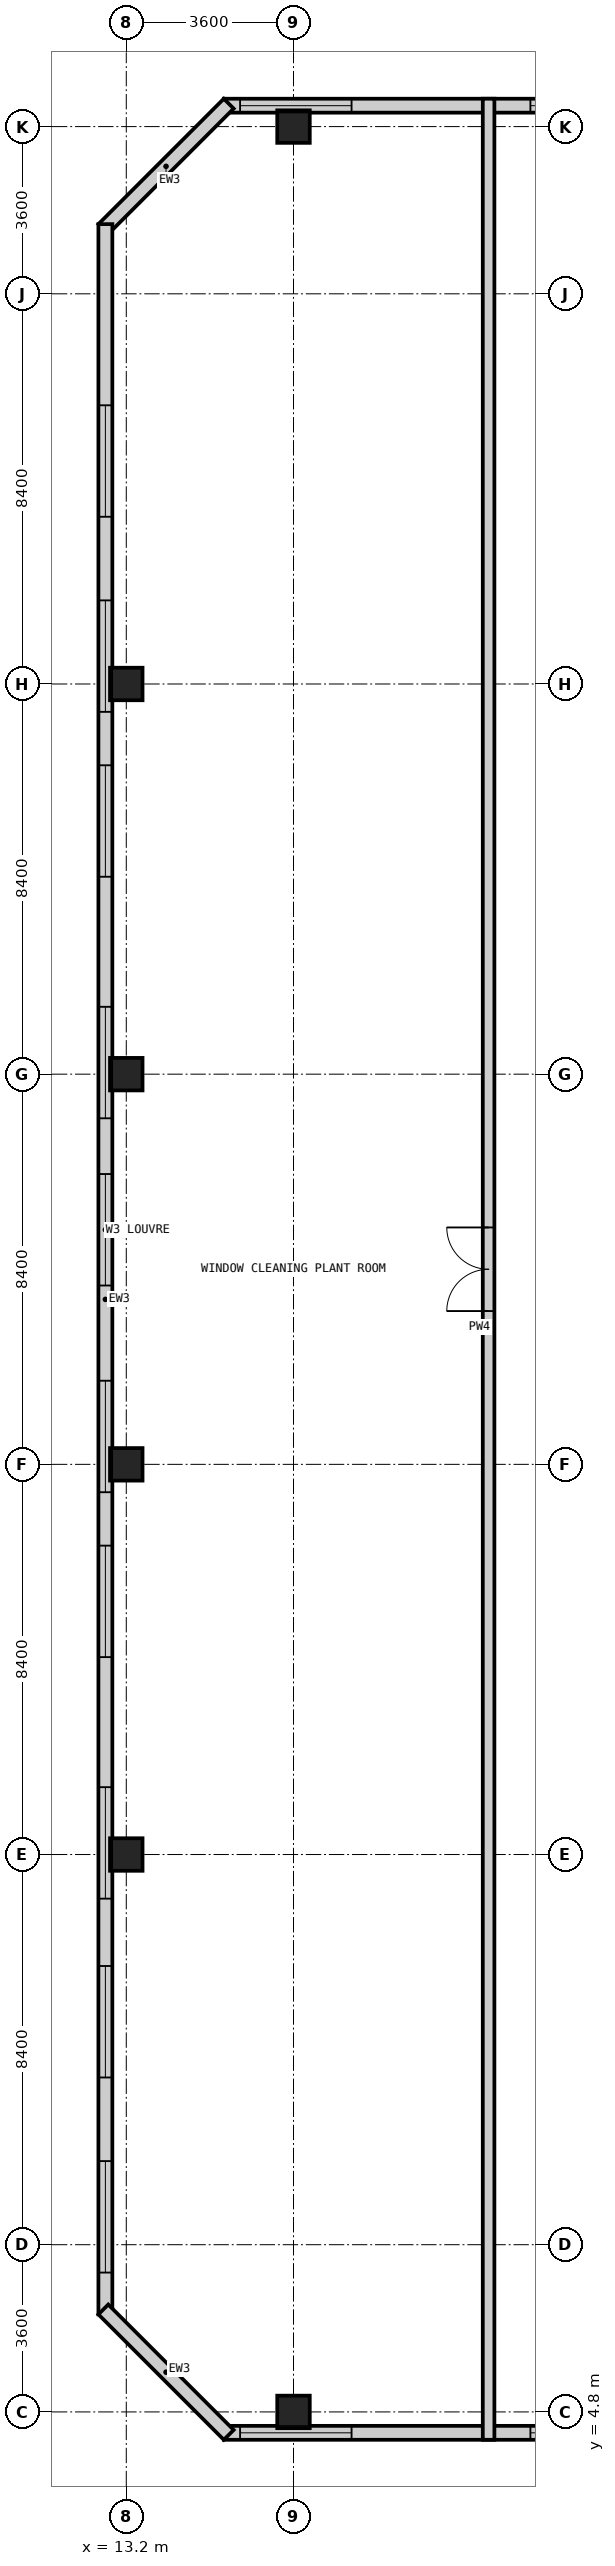
"""IFC4 building model, lengths in metres.
Left out: names, types, materials, properties, quantities, classifications, styles, units other than length and angle.
Written with IfcOpenShell. Run it as: python <this file> out.ifc"""

import sys

from ifc_helpers import new_model, si_unit, direction, frame, frame_2d, origin, origin_2d, place, context, subcontext, project, spatial, polyline, rectangle, hollow_rectangle, outline, extrude, element, fill, save


model = new_model("IFC4")
c1 = context("Model", 3, precision=1e-05, world=origin(), true_north=direction((0.0, 1.0)))
c2 = subcontext(c1, "Body", "Model", "MODEL_VIEW")
j1 = project(units=[si_unit("LENGTHUNIT", "METRE"), si_unit("PLANEANGLEUNIT", "RADIAN")], contexts=[c1])
p1 = place(None, origin())
s1 = spatial("IfcSite", under=j1, at=p1, CompositionType="ELEMENT")
p2 = place(p1, origin())
s2 = spatial("IfcBuilding", under=s1, at=p2, CompositionType="ELEMENT")
p3 = place(p2, frame((0.0, 0.0, 293.6)))
s3 = spatial("IfcBuildingStorey", under=s2, at=p3, CompositionType="ELEMENT", Elevation=293.6)
p4 = place(p3, frame((16.8, 4.8, -0.35), z_axis=(0.0, 0.0, 1.0), x_axis=(1.0, 0.0, 0.0)))
e1 = element("IfcColumn", 1, at=p4, inside=s3, PredefinedType="COLUMN", context=c2, shape_type="SweptSolid", body=[
    extrude(hollow_rectangle(XDim=0.7, YDim=0.7, WallThickness=0.06, at=origin_2d()), origin(), (0.0, 0.0, 1.0), 5.106),
])
for number, where, z_axis, x_axis in (
    (2, (13.2, 16.8, -0.35), (0.0, 0.0, 1.0), (1.0, 0.0, 0.0)),
    (3, (13.2, 25.2, -0.35), (0.0, 0.0, 1.0), (1.0, 0.0, 0.0)),
    (4, (13.2, 33.6, -0.35), (0.0, 0.0, 1.0), (1.0, 0.0, 0.0)),
    (5, (13.2, 42.0, -0.35), (0.0, 0.0, 1.0), (1.0, 0.0, 0.0)),
):
    element("IfcColumn", number, at=place(p3, frame(where, z_axis=z_axis, x_axis=x_axis)), inside=s3, PredefinedType="COLUMN", context=c2, shape_type="SweptSolid", body=[
        extrude(hollow_rectangle(XDim=0.7, YDim=0.7, WallThickness=0.06, at=origin_2d()), origin(), (0.0, 0.0, 1.0), 4.04),
    ])
p5 = place(p3, frame((16.8, 54.0, -0.35), z_axis=(0.0, 0.0, 1.0), x_axis=(1.0, 0.0, 0.0)))
e6 = element("IfcColumn", 6, at=p5, inside=s3, PredefinedType="COLUMN", context=c2, shape_type="SweptSolid", body=[
    extrude(hollow_rectangle(XDim=0.7, YDim=0.7, WallThickness=0.06, at=origin_2d()), origin(), (0.0, 0.0, 1.0), 5.106),
])
p6 = place(p3, frame((15.3, 4.35, 0.0), z_axis=(0.0, 0.0, 1.0), x_axis=(1.0, 0.0, 0.0)))
e7 = element("IfcWall", 7, at=p6, inside=s3, PredefinedType="SOLIDWALL", context=c2, shape_type="SweptSolid", body=[
    extrude(outline(polyline([(0.0, 0.0), (36.6, 0.0), (36.6, 14.771), (0.0, 4.965), (0.0, 0.0)])), frame((0.0, 0.15, 0.0), z_axis=(0.0, -1.0, 0.0), x_axis=(1.0, 0.0, 0.0)), (0.0, 0.0, 1.0), 0.3),
])
p7 = place(p6, frame((0.35, 0.0, 1.4)))
e8 = element("IfcOpeningElement", 8, at=p7, cuts=e7, PredefinedType="OPENING", context=c2, shape_type="SweptSolid", body=[
    extrude(rectangle(XDim=2.4, YDim=1.5, at=frame_2d((1.2, 0.75))), frame((0.0, 0.16, 0.0), z_axis=(0.0, -1.0, 0.0), x_axis=(1.0, 0.0, 0.0)), (0.0, 0.0, 1.0), 0.32),
])
p8 = place(p6, frame((6.6, 0.0, 0.6)))
e9 = element("IfcOpeningElement", 9, at=p8, cuts=e7, PredefinedType="OPENING", context=c2, shape_type="SweptSolid", body=[
    extrude(rectangle(XDim=2.4, YDim=1.5, at=frame_2d((1.2, 0.75))), frame((0.0, 0.16, 0.0), z_axis=(0.0, -1.0, 0.0), x_axis=(1.0, 0.0, 0.0)), (0.0, 0.0, 1.0), 0.32),
])
p9 = place(p6, frame((10.8, 0.0, 0.6)))
e10 = element("IfcOpeningElement", 10, at=p9, cuts=e7, PredefinedType="OPENING", context=c2, shape_type="SweptSolid", body=[
    extrude(rectangle(XDim=2.4, YDim=1.5, at=frame_2d((1.2, 0.75))), frame((0.0, 0.16, 0.0), z_axis=(0.0, -1.0, 0.0), x_axis=(1.0, 0.0, 0.0)), (0.0, 0.0, 1.0), 0.32),
])
p10 = place(p6, frame((15.55, 0.0, 2.6)))
e11 = element("IfcOpeningElement", 11, at=p10, cuts=e7, PredefinedType="OPENING", context=c2, shape_type="SweptSolid", body=[
    extrude(rectangle(XDim=2.4, YDim=1.5, at=frame_2d((1.2, 0.75))), frame((0.0, 0.16, 0.0), z_axis=(0.0, -1.0, 0.0), x_axis=(1.0, 0.0, 0.0)), (0.0, 0.0, 1.0), 0.32),
])
p11 = place(p6, frame((19.8, 0.0, 0.6)))
e12 = element("IfcOpeningElement", 12, at=p11, cuts=e7, PredefinedType="OPENING", context=c2, shape_type="SweptSolid", body=[
    extrude(rectangle(XDim=2.4, YDim=1.5, at=frame_2d((1.2, 0.75))), frame((0.0, 0.16, 0.0), z_axis=(0.0, -1.0, 0.0), x_axis=(1.0, 0.0, 0.0)), (0.0, 0.0, 1.0), 0.32),
])
p12 = place(p6, frame((23.4, 0.0, 0.6)))
e13 = element("IfcOpeningElement", 13, at=p12, cuts=e7, PredefinedType="OPENING", context=c2, shape_type="SweptSolid", body=[
    extrude(rectangle(XDim=2.4, YDim=1.5, at=frame_2d((1.2, 0.75))), frame((0.0, 0.16, 0.0), z_axis=(0.0, -1.0, 0.0), x_axis=(1.0, 0.0, 0.0)), (0.0, 0.0, 1.0), 0.32),
])
p13 = place(p6, frame((27.6, 0.0, 0.6)))
e14 = element("IfcOpeningElement", 14, at=p13, cuts=e7, PredefinedType="OPENING", context=c2, shape_type="SweptSolid", body=[
    extrude(rectangle(XDim=2.4, YDim=1.5, at=frame_2d((1.2, 0.75))), frame((0.0, 0.16, 0.0), z_axis=(0.0, -1.0, 0.0), x_axis=(1.0, 0.0, 0.0)), (0.0, 0.0, 1.0), 0.32),
])
p14 = place(p6, frame((31.2, 0.0, 0.6)))
e15 = element("IfcOpeningElement", 15, at=p14, cuts=e7, PredefinedType="OPENING", context=c2, shape_type="SweptSolid", body=[
    extrude(rectangle(XDim=2.4, YDim=1.5, at=frame_2d((1.2, 0.75))), frame((0.0, 0.16, 0.0), z_axis=(0.0, -1.0, 0.0), x_axis=(1.0, 0.0, 0.0)), (0.0, 0.0, 1.0), 0.32),
])
p15 = place(p3, frame((51.9, 54.45, 0.0), z_axis=(0.0, 0.0, 1.0), x_axis=(-1.0, 0.0, 0.0)))
e16 = element("IfcWall", 16, at=p15, inside=s3, PredefinedType="SOLIDWALL", context=c2, shape_type="SweptSolid", body=[
    extrude(outline(polyline([(0.0, 0.0), (36.6, 0.0), (36.6, 4.965), (0.0, 14.771), (0.0, 0.0)])), frame((0.0, 0.15, 0.0), z_axis=(0.0, -1.0, 0.0), x_axis=(1.0, 0.0, 0.0)), (0.0, 0.0, 1.0), 0.3),
])
p16 = place(p15, frame((33.85, 0.0, 1.4)))
e17 = element("IfcOpeningElement", 17, at=p16, cuts=e16, PredefinedType="OPENING", context=c2, shape_type="SweptSolid", body=[
    extrude(rectangle(XDim=2.4, YDim=1.5, at=frame_2d((1.2, 0.75))), frame((0.0, 0.16, 0.0), z_axis=(0.0, -1.0, 0.0), x_axis=(1.0, 0.0, 0.0)), (0.0, 0.0, 1.0), 0.32),
])
p17 = place(p15, frame((27.6, 0.0, 0.6)))
e18 = element("IfcOpeningElement", 18, at=p17, cuts=e16, PredefinedType="OPENING", context=c2, shape_type="SweptSolid", body=[
    extrude(rectangle(XDim=2.4, YDim=1.5, at=frame_2d((1.2, 0.75))), frame((0.0, 0.16, 0.0), z_axis=(0.0, -1.0, 0.0), x_axis=(1.0, 0.0, 0.0)), (0.0, 0.0, 1.0), 0.32),
])
p18 = place(p15, frame((23.4, 0.0, 0.6)))
e19 = element("IfcOpeningElement", 19, at=p18, cuts=e16, PredefinedType="OPENING", context=c2, shape_type="SweptSolid", body=[
    extrude(rectangle(XDim=2.4, YDim=1.5, at=frame_2d((1.2, 0.75))), frame((0.0, 0.16, 0.0), z_axis=(0.0, -1.0, 0.0), x_axis=(1.0, 0.0, 0.0)), (0.0, 0.0, 1.0), 0.32),
])
p19 = place(p15, frame((18.65, 0.0, 2.6)))
e20 = element("IfcOpeningElement", 20, at=p19, cuts=e16, PredefinedType="OPENING", context=c2, shape_type="SweptSolid", body=[
    extrude(rectangle(XDim=2.4, YDim=1.5, at=frame_2d((1.2, 0.75))), frame((0.0, 0.16, 0.0), z_axis=(0.0, -1.0, 0.0), x_axis=(1.0, 0.0, 0.0)), (0.0, 0.0, 1.0), 0.32),
])
p20 = place(p15, frame((14.4, 0.0, 0.6)))
e21 = element("IfcOpeningElement", 21, at=p20, cuts=e16, PredefinedType="OPENING", context=c2, shape_type="SweptSolid", body=[
    extrude(rectangle(XDim=2.4, YDim=1.5, at=frame_2d((1.2, 0.75))), frame((0.0, 0.16, 0.0), z_axis=(0.0, -1.0, 0.0), x_axis=(1.0, 0.0, 0.0)), (0.0, 0.0, 1.0), 0.32),
])
p21 = place(p15, frame((10.8, 0.0, 0.6)))
e22 = element("IfcOpeningElement", 22, at=p21, cuts=e16, PredefinedType="OPENING", context=c2, shape_type="SweptSolid", body=[
    extrude(rectangle(XDim=2.4, YDim=1.5, at=frame_2d((1.2, 0.75))), frame((0.0, 0.16, 0.0), z_axis=(0.0, -1.0, 0.0), x_axis=(1.0, 0.0, 0.0)), (0.0, 0.0, 1.0), 0.32),
])
p22 = place(p15, frame((6.6, 0.0, 0.6)))
e23 = element("IfcOpeningElement", 23, at=p22, cuts=e16, PredefinedType="OPENING", context=c2, shape_type="SweptSolid", body=[
    extrude(rectangle(XDim=2.4, YDim=1.5, at=frame_2d((1.2, 0.75))), frame((0.0, 0.16, 0.0), z_axis=(0.0, -1.0, 0.0), x_axis=(1.0, 0.0, 0.0)), (0.0, 0.0, 1.0), 0.32),
])
p23 = place(p15, frame((3.0, 0.0, 0.6)))
e24 = element("IfcOpeningElement", 24, at=p23, cuts=e16, PredefinedType="OPENING", context=c2, shape_type="SweptSolid", body=[
    extrude(rectangle(XDim=2.4, YDim=1.5, at=frame_2d((1.2, 0.75))), frame((0.0, 0.16, 0.0), z_axis=(0.0, -1.0, 0.0), x_axis=(1.0, 0.0, 0.0)), (0.0, 0.0, 1.0), 0.32),
])
p24 = place(p3, frame((15.406, 54.494, 0.0), z_axis=(0.0, 0.0, 1.0), x_axis=(-0.707106781187, -0.707106781187, 0.0)))
e25 = element("IfcWall", 25, at=p24, inside=s3, PredefinedType="SOLIDWALL", context=c2, shape_type="SweptSolid", body=[
    extrude(outline(polyline([(0.0, 0.0), (3.818, 0.0), (3.818, 4.27), (0.0, 4.993), (0.0, 0.0)])), frame((0.0, 0.15, 0.0), z_axis=(0.0, -1.0, 0.0), x_axis=(1.0, 0.0, 0.0)), (0.0, 0.0, 1.0), 0.3),
])
p25 = place(p3, frame((12.75, 51.9, 0.0), z_axis=(0.0, 0.0, 1.0), x_axis=(0.0, -1.0, 0.0)))
e26 = element("IfcWall", 26, at=p25, inside=s3, PredefinedType="SOLIDWALL", context=c2, shape_type="SweptSolid", body=[
    extrude(outline(polyline([(0.0, 0.0), (45.0, 0.0), (45.0, 4.281), (0.0, 4.281), (0.0, 0.0)])), frame((0.0, 0.15, 0.0), z_axis=(0.0, -1.0, 0.0), x_axis=(1.0, 0.0, 0.0)), (0.0, 0.0, 1.0), 0.3),
])
p26 = place(p25, frame((41.7, 0.0, 0.6)))
e27 = element("IfcOpeningElement", 27, at=p26, cuts=e26, PredefinedType="OPENING", context=c2, shape_type="SweptSolid", body=[
    extrude(rectangle(XDim=2.4, YDim=1.5, at=frame_2d((1.2, 0.75))), frame((0.0, 0.16, 0.0), z_axis=(0.0, -1.0, 0.0), x_axis=(1.0, 0.0, 0.0)), (0.0, 0.0, 1.0), 0.32),
])
p27 = place(p25, frame((37.5, 0.0, 0.6)))
e28 = element("IfcOpeningElement", 28, at=p27, cuts=e26, PredefinedType="OPENING", context=c2, shape_type="SweptSolid", body=[
    extrude(rectangle(XDim=2.4, YDim=1.5, at=frame_2d((1.2, 0.75))), frame((0.0, 0.16, 0.0), z_axis=(0.0, -1.0, 0.0), x_axis=(1.0, 0.0, 0.0)), (0.0, 0.0, 1.0), 0.32),
])
p28 = place(p25, frame((33.65, 0.0, 1.0)))
e29 = element("IfcOpeningElement", 29, at=p28, cuts=e26, PredefinedType="OPENING", context=c2, shape_type="SweptSolid", body=[
    extrude(rectangle(XDim=2.4, YDim=1.5, at=frame_2d((1.2, 0.75))), frame((0.0, 0.16, 0.0), z_axis=(0.0, -1.0, 0.0), x_axis=(1.0, 0.0, 0.0)), (0.0, 0.0, 1.0), 0.32),
])
p29 = place(p25, frame((28.45, 0.0, 0.3)))
e30 = element("IfcOpeningElement", 30, at=p29, cuts=e26, PredefinedType="OPENING", context=c2, shape_type="SweptSolid", body=[
    extrude(rectangle(XDim=2.4, YDim=1.5, at=frame_2d((1.2, 0.75))), frame((0.0, 0.16, 0.0), z_axis=(0.0, -1.0, 0.0), x_axis=(1.0, 0.0, 0.0)), (0.0, 0.0, 1.0), 0.32),
])
p30 = place(p25, frame((24.9, 0.0, 0.6)))
e31 = element("IfcOpeningElement", 31, at=p30, cuts=e26, PredefinedType="OPENING", context=c2, shape_type="SweptSolid", body=[
    extrude(rectangle(XDim=2.4, YDim=1.5, at=frame_2d((1.2, 0.75))), frame((0.0, 0.16, 0.0), z_axis=(0.0, -1.0, 0.0), x_axis=(1.0, 0.0, 0.0)), (0.0, 0.0, 1.0), 0.32),
])
p31 = place(p25, frame((20.45, 0.0, 2.2)))
e32 = element("IfcOpeningElement", 32, at=p31, cuts=e26, PredefinedType="OPENING", context=c2, shape_type="SweptSolid", body=[
    extrude(rectangle(XDim=2.4, YDim=1.5, at=frame_2d((1.2, 0.75))), frame((0.0, 0.16, 0.0), z_axis=(0.0, -1.0, 0.0), x_axis=(1.0, 0.0, 0.0)), (0.0, 0.0, 1.0), 0.32),
])
p32 = place(p25, frame((16.85, 0.0, 1.0)))
e33 = element("IfcOpeningElement", 33, at=p32, cuts=e26, PredefinedType="OPENING", context=c2, shape_type="SweptSolid", body=[
    extrude(rectangle(XDim=2.4, YDim=1.5, at=frame_2d((1.2, 0.75))), frame((0.0, 0.16, 0.0), z_axis=(0.0, -1.0, 0.0), x_axis=(1.0, 0.0, 0.0)), (0.0, 0.0, 1.0), 0.32),
])
p33 = place(p25, frame((11.65, 0.0, 0.3)))
e34 = element("IfcOpeningElement", 34, at=p33, cuts=e26, PredefinedType="OPENING", context=c2, shape_type="SweptSolid", body=[
    extrude(rectangle(XDim=2.4, YDim=1.5, at=frame_2d((1.2, 0.75))), frame((0.0, 0.16, 0.0), z_axis=(0.0, -1.0, 0.0), x_axis=(1.0, 0.0, 0.0)), (0.0, 0.0, 1.0), 0.32),
])
p34 = place(p25, frame((8.1, 0.0, 0.6)))
e35 = element("IfcOpeningElement", 35, at=p34, cuts=e26, PredefinedType="OPENING", context=c2, shape_type="SweptSolid", body=[
    extrude(rectangle(XDim=2.4, YDim=1.5, at=frame_2d((1.2, 0.75))), frame((0.0, 0.16, 0.0), z_axis=(0.0, -1.0, 0.0), x_axis=(1.0, 0.0, 0.0)), (0.0, 0.0, 1.0), 0.32),
])
p35 = place(p25, frame((3.9, 0.0, 0.6)))
e36 = element("IfcOpeningElement", 36, at=p35, cuts=e26, PredefinedType="OPENING", context=c2, shape_type="SweptSolid", body=[
    extrude(rectangle(XDim=2.4, YDim=1.5, at=frame_2d((1.2, 0.75))), frame((0.0, 0.16, 0.0), z_axis=(0.0, -1.0, 0.0), x_axis=(1.0, 0.0, 0.0)), (0.0, 0.0, 1.0), 0.32),
])
p36 = place(p3, frame((12.706, 7.006, 0.0), z_axis=(0.0, 0.0, 1.0), x_axis=(0.707074812166, -0.707138748762, 0.0)))
e37 = element("IfcWall", 37, at=p36, inside=s3, PredefinedType="SOLIDWALL", context=c2, shape_type="SweptSolid", body=[
    extrude(outline(polyline([(0.0, 0.0), (3.818, 0.0), (3.818, 4.993), (0.0, 4.27), (0.0, 0.0)])), frame((0.0, 0.15, 0.0), z_axis=(0.0, -1.0, 0.0), x_axis=(1.0, 0.0, 0.0)), (0.0, 0.0, 1.0), 0.3),
])
p37 = place(p3, frame((21.0, 4.2, 0.0), z_axis=(0.0, 0.0, 1.0), x_axis=(0.0, 1.0, 0.0)))
e38 = element("IfcWall", 38, at=p37, inside=s3, PredefinedType="PARTITIONING", context=c2, shape_type="SweptSolid", body=[
    extrude(outline(polyline([(0.0, 0.0), (50.4, 0.0), (50.4, 6.492), (0.0, 6.492), (0.0, 0.0)])), frame((0.0, 0.125, 0.0), z_axis=(0.0, -1.0, 0.0), x_axis=(1.0, 0.0, 0.0)), (0.0, 0.0, 1.0), 0.25),
])
p38 = place(p37, frame((24.3, 0.0, 0.0)))
e39 = element("IfcOpeningElement", 39, at=p38, cuts=e38, PredefinedType="OPENING", context=c2, shape_type="SweptSolid", body=[
    extrude(rectangle(XDim=1.8, YDim=2.4, at=frame_2d((0.9, 1.2))), frame((0.0, 0.135, 0.0), z_axis=(0.0, -1.0, 0.0), x_axis=(1.0, 0.0, 0.0)), (0.0, 0.0, 1.0), 0.27),
])
p39 = place(p7, origin())
e40 = element("IfcWindow", 40, at=p39, inside=s3, PartitioningType="SINGLE_PANEL", PredefinedType="WINDOW", context=c2, shape_type="SweptSolid", body=[
    extrude(rectangle(XDim=2.4, YDim=1.5, at=frame_2d((1.2, 0.75))), frame((0.0, 0.03, 0.0), z_axis=(0.0, -1.0, 0.0), x_axis=(1.0, 0.0, 0.0)), (0.0, 0.0, 1.0), 0.06),
])
fill(e8, e40)
p40 = place(p8, origin())
e41 = element("IfcWindow", 41, at=p40, inside=s3, PartitioningType="SINGLE_PANEL", PredefinedType="WINDOW", context=c2, shape_type="SweptSolid", body=[
    extrude(rectangle(XDim=2.4, YDim=1.5, at=frame_2d((1.2, 0.75))), frame((0.0, 0.03, 0.0), z_axis=(0.0, -1.0, 0.0), x_axis=(1.0, 0.0, 0.0)), (0.0, 0.0, 1.0), 0.06),
])
fill(e9, e41)
p41 = place(p16, origin())
e42 = element("IfcWindow", 42, at=p41, inside=s3, PartitioningType="SINGLE_PANEL", PredefinedType="WINDOW", context=c2, shape_type="SweptSolid", body=[
    extrude(rectangle(XDim=2.4, YDim=1.5, at=frame_2d((1.2, 0.75))), frame((0.0, 0.03, 0.0), z_axis=(0.0, -1.0, 0.0), x_axis=(1.0, 0.0, 0.0)), (0.0, 0.0, 1.0), 0.06),
])
fill(e17, e42)
p42 = place(p17, origin())
e43 = element("IfcWindow", 43, at=p42, inside=s3, PartitioningType="SINGLE_PANEL", PredefinedType="WINDOW", context=c2, shape_type="SweptSolid", body=[
    extrude(rectangle(XDim=2.4, YDim=1.5, at=frame_2d((1.2, 0.75))), frame((0.0, 0.03, 0.0), z_axis=(0.0, -1.0, 0.0), x_axis=(1.0, 0.0, 0.0)), (0.0, 0.0, 1.0), 0.06),
])
fill(e18, e43)
p43 = place(p26, origin())
e44 = element("IfcWindow", 44, at=p43, inside=s3, PartitioningType="SINGLE_PANEL", PredefinedType="WINDOW", context=c2, shape_type="SweptSolid", body=[
    extrude(rectangle(XDim=2.4, YDim=1.5, at=frame_2d((1.2, 0.75))), frame((0.0, 0.03, 0.0), z_axis=(0.0, -1.0, 0.0), x_axis=(1.0, 0.0, 0.0)), (0.0, 0.0, 1.0), 0.06),
])
fill(e27, e44)
p44 = place(p27, origin())
e45 = element("IfcWindow", 45, at=p44, inside=s3, PartitioningType="SINGLE_PANEL", PredefinedType="WINDOW", context=c2, shape_type="SweptSolid", body=[
    extrude(rectangle(XDim=2.4, YDim=1.5, at=frame_2d((1.2, 0.75))), frame((0.0, 0.03, 0.0), z_axis=(0.0, -1.0, 0.0), x_axis=(1.0, 0.0, 0.0)), (0.0, 0.0, 1.0), 0.06),
])
fill(e28, e45)
p45 = place(p28, origin())
e46 = element("IfcWindow", 46, at=p45, inside=s3, PartitioningType="SINGLE_PANEL", PredefinedType="WINDOW", context=c2, shape_type="SweptSolid", body=[
    extrude(rectangle(XDim=2.4, YDim=1.5, at=frame_2d((1.2, 0.75))), frame((0.0, 0.03, 0.0), z_axis=(0.0, -1.0, 0.0), x_axis=(1.0, 0.0, 0.0)), (0.0, 0.0, 1.0), 0.06),
])
fill(e29, e46)
p46 = place(p29, origin())
e47 = element("IfcWindow", 47, at=p46, inside=s3, PartitioningType="SINGLE_PANEL", PredefinedType="WINDOW", context=c2, shape_type="SweptSolid", body=[
    extrude(rectangle(XDim=2.4, YDim=1.5, at=frame_2d((1.2, 0.75))), frame((0.0, 0.03, 0.0), z_axis=(0.0, -1.0, 0.0), x_axis=(1.0, 0.0, 0.0)), (0.0, 0.0, 1.0), 0.06),
])
fill(e30, e47)
p47 = place(p30, origin())
e48 = element("IfcWindow", 48, at=p47, inside=s3, PartitioningType="SINGLE_PANEL", PredefinedType="WINDOW", context=c2, shape_type="SweptSolid", body=[
    extrude(rectangle(XDim=2.4, YDim=1.5, at=frame_2d((1.2, 0.75))), frame((0.0, 0.03, 0.0), z_axis=(0.0, -1.0, 0.0), x_axis=(1.0, 0.0, 0.0)), (0.0, 0.0, 1.0), 0.06),
])
fill(e31, e48)
p48 = place(p31, origin())
e49 = element("IfcWindow", 49, at=p48, inside=s3, PartitioningType="SINGLE_PANEL", PredefinedType="WINDOW", context=c2, shape_type="SweptSolid", body=[
    extrude(rectangle(XDim=2.4, YDim=1.5, at=frame_2d((1.2, 0.75))), frame((0.0, 0.03, 0.0), z_axis=(0.0, -1.0, 0.0), x_axis=(1.0, 0.0, 0.0)), (0.0, 0.0, 1.0), 0.06),
])
fill(e32, e49)
p49 = place(p32, origin())
e50 = element("IfcWindow", 50, at=p49, inside=s3, PartitioningType="SINGLE_PANEL", PredefinedType="WINDOW", context=c2, shape_type="SweptSolid", body=[
    extrude(rectangle(XDim=2.4, YDim=1.5, at=frame_2d((1.2, 0.75))), frame((0.0, 0.03, 0.0), z_axis=(0.0, -1.0, 0.0), x_axis=(1.0, 0.0, 0.0)), (0.0, 0.0, 1.0), 0.06),
])
fill(e33, e50)
p50 = place(p33, origin())
e51 = element("IfcWindow", 51, at=p50, inside=s3, PartitioningType="SINGLE_PANEL", PredefinedType="WINDOW", context=c2, shape_type="SweptSolid", body=[
    extrude(rectangle(XDim=2.4, YDim=1.5, at=frame_2d((1.2, 0.75))), frame((0.0, 0.03, 0.0), z_axis=(0.0, -1.0, 0.0), x_axis=(1.0, 0.0, 0.0)), (0.0, 0.0, 1.0), 0.06),
])
fill(e34, e51)
p51 = place(p34, origin())
e52 = element("IfcWindow", 52, at=p51, inside=s3, PartitioningType="SINGLE_PANEL", PredefinedType="WINDOW", context=c2, shape_type="SweptSolid", body=[
    extrude(rectangle(XDim=2.4, YDim=1.5, at=frame_2d((1.2, 0.75))), frame((0.0, 0.03, 0.0), z_axis=(0.0, -1.0, 0.0), x_axis=(1.0, 0.0, 0.0)), (0.0, 0.0, 1.0), 0.06),
])
fill(e35, e52)
p52 = place(p35, origin())
e53 = element("IfcWindow", 53, at=p52, inside=s3, PartitioningType="SINGLE_PANEL", PredefinedType="WINDOW", context=c2, shape_type="SweptSolid", body=[
    extrude(rectangle(XDim=2.4, YDim=1.5, at=frame_2d((1.2, 0.75))), frame((0.0, 0.03, 0.0), z_axis=(0.0, -1.0, 0.0), x_axis=(1.0, 0.0, 0.0)), (0.0, 0.0, 1.0), 0.06),
])
fill(e36, e53)
p53 = place(p38, origin())
e54 = element("IfcDoor", 54, at=p53, inside=s3, OperationType="DOUBLE_DOOR_DOUBLE_SWING", PredefinedType="DOOR", context=c2, shape_type="SweptSolid", body=[
    extrude(rectangle(XDim=1.8, YDim=2.4, at=frame_2d((0.9, 1.2))), frame((0.0, 0.025, 0.0), z_axis=(0.0, -1.0, 0.0), x_axis=(1.0, 0.0, 0.0)), (0.0, 0.0, 1.0), 0.05),
])
fill(e39, e54)
save(model, sys.argv[1])
